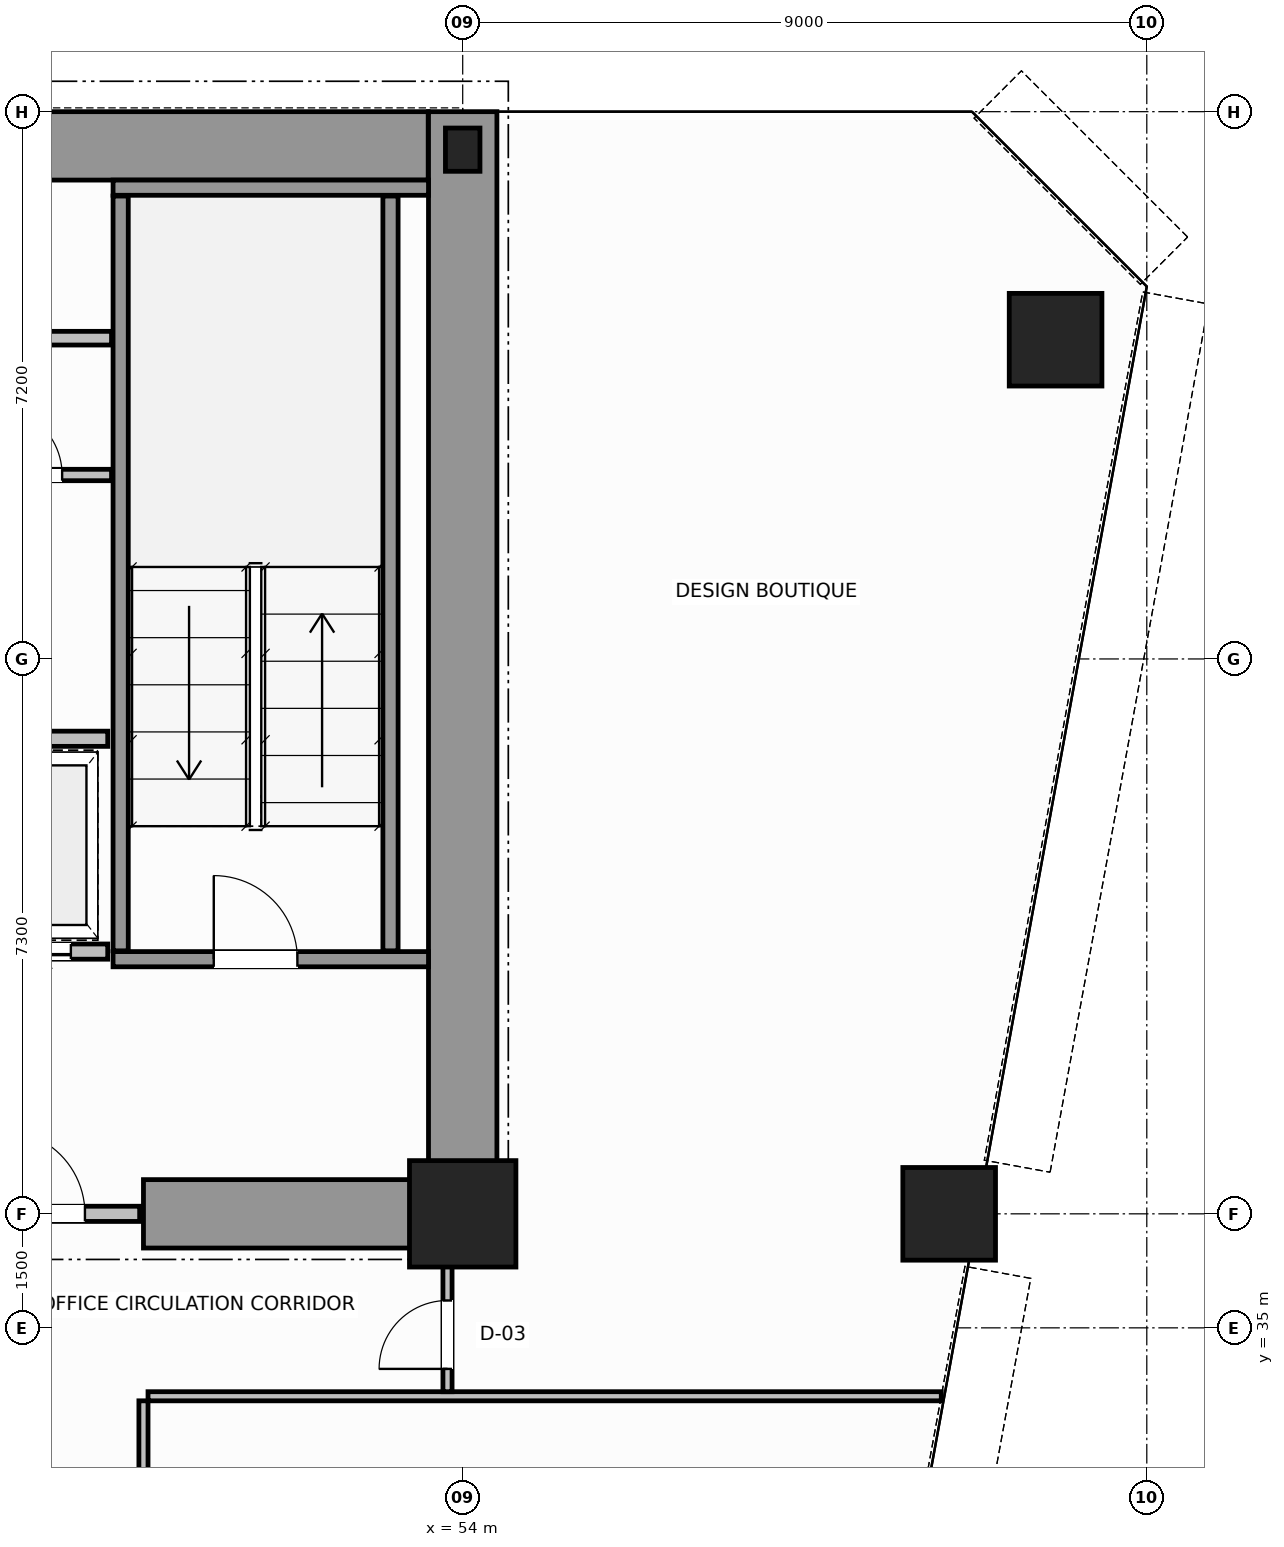
"""IFC4 building model, lengths in metres.
Left out: names, types, materials, properties, quantities, classifications, styles, units other than length and angle.
Written with IfcOpenShell. Run it as: python <this file> out.ifc"""

import sys

from ifc_helpers import new_model, si_unit, direction, frame, frame_2d, origin, origin_2d, place, context, subcontext, project, spatial, rectangle, hollow_circle, i_section, extrude, source, transform, mapped, element, fill, save


model = new_model("IFC4")
c1 = context("Model", 3, precision=1e-05, world=origin(), true_north=direction((0.0, 1.0)))
c2 = subcontext(c1, "Body", "Model", "MODEL_VIEW")
j1 = project(units=[si_unit("LENGTHUNIT", "METRE"), si_unit("PLANEANGLEUNIT", "RADIAN")], contexts=[c1])
p1 = place(None, origin())
s1 = spatial("IfcSite", under=j1, at=p1, CompositionType="ELEMENT")
p2 = place(p1, origin())
s2 = spatial("IfcBuilding", under=s1, at=p2, CompositionType="ELEMENT")
p3 = place(p2, frame((0.0, 0.0, 64.4)))
s3 = spatial("IfcBuildingStorey", under=s2, at=p3, CompositionType="ELEMENT", Elevation=64.4)
m1 = source(origin(), c2, "Body", "SweptSolid", [
    extrude(rectangle(XDim=1.4, YDim=1.4, at=origin_2d()), origin(), (0.0, 0.0, 1.0), 3.8),
])
p4 = place(p3, frame((54.0, 36.5, 0.0), z_axis=(0.0, 0.0, 1.0), x_axis=(1.0, 0.0, 0.0)))
e1 = element("IfcColumn", 1, at=p4, inside=s3, PredefinedType="COLUMN", context=c2, shape_type="MappedRepresentation", body=[
    mapped(m1, transform((0.0, 0.0, 0.0), scale=1.0)),
])
m2 = source(origin(), c2, "Body", "SweptSolid", [
    extrude(i_section(OverallWidth=0.454, OverallDepth=0.569, WebThickness=0.078, FlangeThickness=0.08, FilletRadius=0.015, at=origin_2d()), origin(), (0.0, 0.0, 1.0), 3.8),
])
p5 = place(p3, frame((54.0, 50.5, 0.0), z_axis=(0.0, 0.0, 1.0), x_axis=(1.0, 0.0, 0.0)))
e2 = element("IfcColumn", 2, at=p5, inside=s3, PredefinedType="COLUMN", context=c2, shape_type="MappedRepresentation", body=[
    mapped(m2, transform((0.0, 0.0, 0.0), scale=1.0)),
])
m3 = source(origin(), c2, "Body", "SweptSolid", [
    extrude(hollow_circle(Radius=0.61, WallThickness=0.05, at=origin_2d()), origin(), (0.0, 0.0, 1.0), 3.8),
])
for number, where, z_axis, x_axis in (
    (3, (61.8, 48.0, 0.0), (0.0, 0.0, 1.0), (1.0, 0.0, 0.0)),
    (4, (60.4, 36.5, 0.0), (0.0, 0.0, 1.0), (1.0, 0.0, 0.0)),
):
    element("IfcColumn", number, at=place(p3, frame(where, z_axis=z_axis, x_axis=x_axis)), inside=s3, PredefinedType="COLUMN", context=c2, shape_type="MappedRepresentation", body=[
        mapped(m3, transform((0.0, 0.0, 0.0), scale=1.0)),
    ])
p6 = place(p3, frame((34.002, 50.55, 0.0), z_axis=(0.0, 0.0, 1.0), x_axis=(1.0, 0.0, 0.0)))
e5 = element("IfcWall", 5, at=p6, inside=s3, PredefinedType="SHEAR", context=c2, shape_type="SweptSolid", body=[
    extrude(rectangle(XDim=19.544, YDim=0.9, at=frame_2d((9.772, 0.0))), origin(), (0.0, 0.0, 1.0), 3.8),
])
p7 = place(p3, frame((54.0, 36.5, 0.0), z_axis=(0.0, 0.0, 1.0), x_axis=(0.0, 1.0, 0.0)))
e6 = element("IfcWall", 6, at=p7, inside=s3, PredefinedType="SHEAR", context=c2, shape_type="SweptSolid", body=[
    extrude(rectangle(XDim=14.5, YDim=0.9, at=frame_2d((7.25, 0.0))), origin(), (0.0, 0.0, 1.0), 3.8),
])
p8 = place(p3, frame((49.8, 36.5, 0.0), z_axis=(0.0, 0.0, 1.0), x_axis=(1.0, 0.0, 0.0)))
e7 = element("IfcWall", 7, at=p8, inside=s3, PredefinedType="SHEAR", context=c2, shape_type="SweptSolid", body=[
    extrude(rectangle(XDim=3.73, YDim=0.9, at=frame_2d((1.865, 0.0))), origin(), (0.0, 0.0, 1.0), 2.38),
])
p9 = place(p3, frame((49.4, 39.85, 0.0), z_axis=(0.0, 0.0, 1.0), x_axis=(1.0, 0.0, 0.0)))
e8 = element("IfcWall", 8, at=p9, inside=s3, PredefinedType="SOLIDWALL", context=c2, shape_type="SweptSolid", body=[
    extrude(rectangle(XDim=4.15, YDim=0.2, at=frame_2d((2.075, 0.0))), origin(), (0.0, 0.0, 1.0), 3.8),
])
p10 = place(p9, frame((1.325, 0.0, 0.0)))
e9 = element("IfcOpeningElement", 9, at=p10, cuts=e8, PredefinedType="OPENING", context=c2, shape_type="SweptSolid", body=[
    extrude(rectangle(XDim=1.1, YDim=2.15, at=frame_2d((0.55, 1.075))), frame((0.0, 0.11, 0.0), z_axis=(0.0, -1.0, 0.0), x_axis=(1.0, 0.0, 0.0)), (0.0, 0.0, 1.0), 0.22),
])
p11 = place(p3, frame((49.4, 50.0, 0.0), z_axis=(0.0, 0.0, 1.0), x_axis=(1.0, 0.0, 0.0)))
e10 = element("IfcWall", 10, at=p11, inside=s3, PredefinedType="SOLIDWALL", context=c2, shape_type="SweptSolid", body=[
    extrude(rectangle(XDim=4.15, YDim=0.2, at=frame_2d((2.075, 0.0))), origin(), (0.0, 0.0, 1.0), 3.8),
])
for number, where, z_axis, x_axis in (
    (11, (49.5, 39.96, 0.0), (0.0, 0.0, 1.0), (0.0, 1.0, 0.0)),
    (12, (53.05, 39.96, 0.0), (0.0, 0.0, 1.0), (0.0, 1.0, 0.0)),
):
    element("IfcWall", number, at=place(p3, frame(where, z_axis=z_axis, x_axis=x_axis)), inside=s3, PredefinedType="SOLIDWALL", context=c2, shape_type="SweptSolid", body=[
        extrude(rectangle(XDim=9.93, YDim=0.2, at=frame_2d((4.965, 0.0))), origin(), (0.0, 0.0, 1.0), 3.8),
    ])
p12 = place(p3, frame((47.28, 36.5, 0.0), z_axis=(0.0, 0.0, 1.0), x_axis=(1.0, 0.0, 0.0)))
e13 = element("IfcWall", 13, at=p12, inside=s3, PredefinedType="SOLIDWALL", context=c2, shape_type="SweptSolid", body=[
    extrude(rectangle(XDim=2.47, YDim=0.2, at=frame_2d((1.235, 0.0))), origin(), (0.0, 0.0, 1.0), 2.37),
])
p13 = place(p12, frame((0.65, 0.0, 0.0)))
e14 = element("IfcOpeningElement", 14, at=p13, cuts=e13, PredefinedType="OPENING", context=c2, shape_type="SweptSolid", body=[
    extrude(rectangle(XDim=1.1, YDim=2.15, at=frame_2d((0.55, 1.075))), frame((0.0, 0.11, 0.0), z_axis=(0.0, -1.0, 0.0), x_axis=(1.0, 0.0, 0.0)), (0.0, 0.0, 1.0), 0.22),
])
p14 = place(p3, frame((47.26, 39.95, 0.0), z_axis=(0.0, 0.0, 1.0), x_axis=(1.0, 0.0, 0.0)))
e15 = element("IfcWall", 15, at=p14, inside=s3, PredefinedType="SOLIDWALL", context=c2, shape_type="SweptSolid", body=[
    extrude(rectangle(XDim=2.07, YDim=0.2, at=frame_2d((1.035, 0.0))), origin(), (0.0, 0.0, 1.0), 3.58),
])
p15 = place(p14, frame((0.485, 0.0, 0.0)))
e16 = element("IfcOpeningElement", 16, at=p15, cuts=e15, PredefinedType="OPENING", context=c2, shape_type="SweptSolid", body=[
    extrude(rectangle(XDim=1.1, YDim=2.15, at=frame_2d((0.55, 1.075))), frame((0.0, 0.11, 0.0), z_axis=(0.0, -1.0, 0.0), x_axis=(1.0, 0.0, 0.0)), (0.0, 0.0, 1.0), 0.22),
])
p16 = place(p3, frame((47.26, 42.75, 0.0), z_axis=(0.0, 0.0, 1.0), x_axis=(1.0, 0.0, 0.0)))
e17 = element("IfcWall", 17, at=p16, inside=s3, PredefinedType="SOLIDWALL", context=c2, shape_type="SweptSolid", body=[
    extrude(rectangle(XDim=2.07, YDim=0.2, at=frame_2d((1.035, 0.0))), origin(), (0.0, 0.0, 1.0), 3.58),
])
p17 = place(p3, frame((47.28, 46.22, 0.0), z_axis=(0.0, 0.0, 1.0), x_axis=(1.0, 0.0, 0.0)))
e18 = element("IfcWall", 18, at=p17, inside=s3, PredefinedType="PARTITIONING", context=c2, shape_type="SweptSolid", body=[
    extrude(rectangle(XDim=2.1, YDim=0.15, at=frame_2d((1.05, 0.0))), origin(), (0.0, 0.0, 1.0), 3.58),
])
p18 = place(p17, frame((0.55, 0.0, 0.0)))
e19 = element("IfcOpeningElement", 19, at=p18, cuts=e18, PredefinedType="OPENING", context=c2, shape_type="SweptSolid", body=[
    extrude(rectangle(XDim=0.9, YDim=2.1, at=frame_2d((0.45, 1.05))), frame((0.0, 0.085, 0.0), z_axis=(0.0, -1.0, 0.0), x_axis=(1.0, 0.0, 0.0)), (0.0, 0.0, 1.0), 0.17),
])
p19 = place(p3, frame((18.62, 48.02, 0.0), z_axis=(0.0, 0.0, 1.0), x_axis=(1.0, 0.0, 0.0)))
e20 = element("IfcWall", 20, at=p19, inside=s3, PredefinedType="PLUMBINGWALL", context=c2, shape_type="SweptSolid", body=[
    extrude(rectangle(XDim=30.76, YDim=0.18, at=frame_2d((15.38, 0.0))), origin(), (0.0, 0.0, 1.0), 3.58),
])
p20 = place(p19, frame((1.655, 0.0, 0.0)))
e21 = element("IfcOpeningElement", 21, at=p20, cuts=e20, PredefinedType="OPENING", context=c2, shape_type="SweptSolid", body=[
    extrude(rectangle(XDim=0.9, YDim=2.15, at=frame_2d((0.45, 1.075))), frame((0.0, 0.1, 0.0), z_axis=(0.0, -1.0, 0.0), x_axis=(1.0, 0.0, 0.0)), (0.0, 0.0, 1.0), 0.2),
])
p21 = place(p19, frame((6.03, 0.0, 0.0)))
e22 = element("IfcOpeningElement", 22, at=p21, cuts=e20, PredefinedType="OPENING", context=c2, shape_type="SweptSolid", body=[
    extrude(rectangle(XDim=0.9, YDim=2.15, at=frame_2d((0.45, 1.075))), frame((0.0, 0.1, 0.0), z_axis=(0.0, -1.0, 0.0), x_axis=(1.0, 0.0, 0.0)), (0.0, 0.0, 1.0), 0.2),
])
p22 = place(p19, frame((10.93, 0.0, 0.0)))
e23 = element("IfcOpeningElement", 23, at=p22, cuts=e20, PredefinedType="OPENING", context=c2, shape_type="SweptSolid", body=[
    extrude(rectangle(XDim=0.9, YDim=2.15, at=frame_2d((0.45, 1.075))), frame((0.0, 0.1, 0.0), z_axis=(0.0, -1.0, 0.0), x_axis=(1.0, 0.0, 0.0)), (0.0, 0.0, 1.0), 0.2),
])
p23 = place(p19, frame((16.13, 0.0, 0.0)))
e24 = element("IfcOpeningElement", 24, at=p23, cuts=e20, PredefinedType="OPENING", context=c2, shape_type="SweptSolid", body=[
    extrude(rectangle(XDim=0.9, YDim=2.15, at=frame_2d((0.45, 1.075))), frame((0.0, 0.1, 0.0), z_axis=(0.0, -1.0, 0.0), x_axis=(1.0, 0.0, 0.0)), (0.0, 0.0, 1.0), 0.2),
])
p24 = place(p19, frame((21.73, 0.0, 0.0)))
e25 = element("IfcOpeningElement", 25, at=p24, cuts=e20, PredefinedType="OPENING", context=c2, shape_type="SweptSolid", body=[
    extrude(rectangle(XDim=0.9, YDim=2.15, at=frame_2d((0.45, 1.075))), frame((0.0, 0.1, 0.0), z_axis=(0.0, -1.0, 0.0), x_axis=(1.0, 0.0, 0.0)), (0.0, 0.0, 1.0), 0.2),
])
p25 = place(p19, frame((27.505, 0.0, 0.0)))
e26 = element("IfcOpeningElement", 26, at=p25, cuts=e20, PredefinedType="OPENING", context=c2, shape_type="SweptSolid", body=[
    extrude(rectangle(XDim=0.9, YDim=2.15, at=frame_2d((0.45, 1.075))), frame((0.0, 0.1, 0.0), z_axis=(0.0, -1.0, 0.0), x_axis=(1.0, 0.0, 0.0)), (0.0, 0.0, 1.0), 0.2),
])
p26 = place(p3, frame((49.86, 34.1, 0.0), z_axis=(0.0, 0.0, 1.0), x_axis=(1.0, 0.0, 0.0)))
e27 = element("IfcWall", 27, at=p26, inside=s3, PredefinedType="PARTITIONING", context=c2, shape_type="SweptSolid", body=[
    extrude(rectangle(XDim=10.436, YDim=0.12, at=frame_2d((5.218, 0.0))), origin(), (0.0, 0.0, 1.0), 3.58),
])
p27 = place(p3, frame((53.8, 34.16, 0.0), z_axis=(0.0, 0.0, 1.0), x_axis=(0.0, 1.0, 0.0)))
e28 = element("IfcWall", 28, at=p27, inside=s3, PredefinedType="PARTITIONING", context=c2, shape_type="SweptSolid", body=[
    extrude(rectangle(XDim=2.28, YDim=0.12, at=frame_2d((1.14, 0.0))), origin(), (0.0, 0.0, 1.0), 3.58),
])
p28 = place(p27, frame((0.3, 0.0, 0.0)))
e29 = element("IfcOpeningElement", 29, at=p28, cuts=e28, PredefinedType="OPENING", context=c2, shape_type="SweptSolid", body=[
    extrude(rectangle(XDim=0.9, YDim=2.15, at=frame_2d((0.45, 1.075))), frame((0.0, 0.07, 0.0), z_axis=(0.0, -1.0, 0.0), x_axis=(1.0, 0.0, 0.0)), (0.0, 0.0, 1.0), 0.14),
])
p29 = place(p3, frame((49.8, 19.6, 0.0), z_axis=(0.0, 0.0, 1.0), x_axis=(0.0, 1.0, 0.0)))
e30 = element("IfcWall", 30, at=p29, inside=s3, PredefinedType="PARTITIONING", context=c2, shape_type="SweptSolid", body=[
    extrude(rectangle(XDim=14.44, YDim=0.12, at=frame_2d((7.22, 0.0))), origin(), (0.0, 0.0, 1.0), 3.58),
])
p30 = place(p29, frame((2.45, 0.0, 0.0)))
e31 = element("IfcOpeningElement", 31, at=p30, cuts=e30, PredefinedType="OPENING", context=c2, shape_type="SweptSolid", body=[
    extrude(rectangle(XDim=0.9, YDim=2.15, at=frame_2d((0.45, 1.075))), frame((0.0, 0.07, 0.0), z_axis=(0.0, -1.0, 0.0), x_axis=(1.0, 0.0, 0.0)), (0.0, 0.0, 1.0), 0.14),
])
p31 = place(p29, frame((8.15, 0.0, 0.0)))
e32 = element("IfcOpeningElement", 32, at=p31, cuts=e30, PredefinedType="OPENING", context=c2, shape_type="SweptSolid", body=[
    extrude(rectangle(XDim=0.9, YDim=2.15, at=frame_2d((0.45, 1.075))), frame((0.0, 0.07, 0.0), z_axis=(0.0, -1.0, 0.0), x_axis=(1.0, 0.0, 0.0)), (0.0, 0.0, 1.0), 0.14),
])
p32 = place(p29, frame((12.47, 0.0, 0.0)))
e33 = element("IfcOpeningElement", 33, at=p32, cuts=e30, PredefinedType="OPENING", context=c2, shape_type="SweptSolid", body=[
    extrude(rectangle(XDim=0.9, YDim=2.15, at=frame_2d((0.45, 1.075))), frame((0.0, 0.07, 0.0), z_axis=(0.0, -1.0, 0.0), x_axis=(1.0, 0.0, 0.0)), (0.0, 0.0, 1.0), 0.14),
])
m4 = source(origin(), c2, "Body", "SweptSolid", [
    extrude(rectangle(XDim=1.1, YDim=2.15, at=frame_2d((0.55, 1.075))), frame((0.0, 0.025, 0.0), z_axis=(0.0, -1.0, 0.0), x_axis=(1.0, 0.0, 0.0)), (0.0, 0.0, 1.0), 0.05),
])
p33 = place(p10, origin())
e34 = element("IfcDoor", 34, at=p33, inside=s3, OperationType="SINGLE_SWING_RIGHT", PredefinedType="DOOR", context=c2, shape_type="MappedRepresentation", body=[
    mapped(m4, transform((0.0, 0.0, 0.0), scale=1.0)),
])
fill(e9, e34)
p34 = place(p13, origin())
e35 = element("IfcDoor", 35, at=p34, inside=s3, OperationType="SINGLE_SWING_LEFT", PredefinedType="DOOR", context=c2, shape_type="MappedRepresentation", body=[
    mapped(m4, transform((0.0, 0.0, 0.0), scale=1.0)),
])
fill(e14, e35)
p35 = place(p15, origin())
e36 = element("IfcDoor", 36, at=p35, inside=s3, OperationType="DOUBLE_DOOR_SLIDING", PredefinedType="DOOR", context=c2, shape_type="MappedRepresentation", body=[
    mapped(m4, transform((0.0, 0.0, 0.0), scale=1.0)),
])
fill(e16, e36)
m5 = source(origin(), c2, "Body", "SweptSolid", [
    extrude(rectangle(XDim=0.9, YDim=2.1, at=frame_2d((0.45, 1.05))), frame((0.0, 0.025, 0.0), z_axis=(0.0, -1.0, 0.0), x_axis=(1.0, 0.0, 0.0)), (0.0, 0.0, 1.0), 0.05),
])
p36 = place(p18, origin())
e37 = element("IfcDoor", 37, at=p36, inside=s3, OperationType="SINGLE_SWING_RIGHT", PredefinedType="DOOR", context=c2, shape_type="MappedRepresentation", body=[
    mapped(m5, transform((0.0, 0.0, 0.0), scale=1.0)),
])
fill(e19, e37)
m6 = source(origin(), c2, "Body", "SweptSolid", [
    extrude(rectangle(XDim=0.9, YDim=2.15, at=frame_2d((0.45, 1.075))), frame((0.0, 0.025, 0.0), z_axis=(0.0, -1.0, 0.0), x_axis=(1.0, 0.0, 0.0)), (0.0, 0.0, 1.0), 0.05),
])
p37 = place(p28, origin())
e38 = element("IfcDoor", 38, at=p37, inside=s3, OperationType="SINGLE_SWING_RIGHT", PredefinedType="DOOR", context=c2, shape_type="MappedRepresentation", body=[
    mapped(m6, transform((0.0, 0.0, 0.0), scale=1.0)),
])
fill(e29, e38)
save(model, sys.argv[1])
